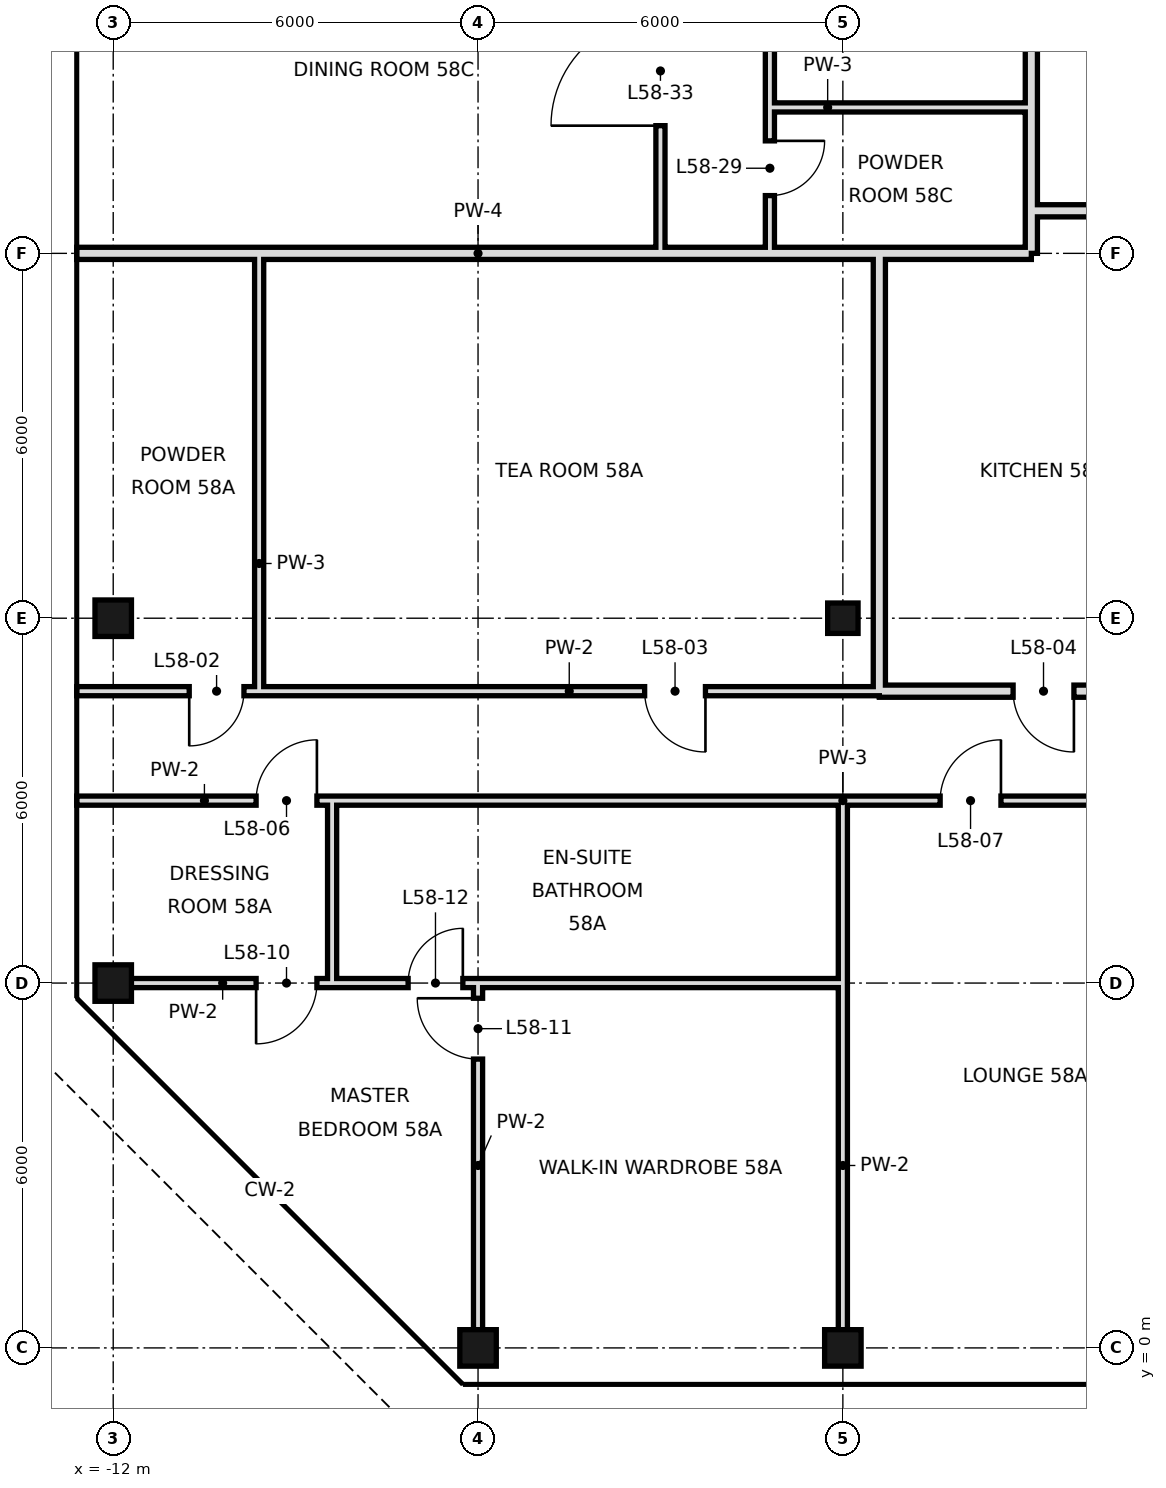
"""IFC4 building model, lengths in metres.
Left out: names, types, materials, properties, quantities, classifications, styles, units other than length and angle.
Written with IfcOpenShell. Run it as: python <this file> out.ifc"""

import sys

from ifc_helpers import new_model, si_unit, direction, frame, frame_2d, origin, origin_2d, place, context, subcontext, project, spatial, rectangle, hollow_rectangle, extrude, element, fill, save


model = new_model("IFC4")
c1 = context("Model", 3, precision=1e-05, world=origin(), true_north=direction((0.0, 1.0)))
c2 = subcontext(c1, "Body", "Model", "MODEL_VIEW")
j1 = project(units=[si_unit("LENGTHUNIT", "METRE"), si_unit("PLANEANGLEUNIT", "RADIAN")], contexts=[c1])
p1 = place(None, origin())
s1 = spatial("IfcSite", under=j1, at=p1, CompositionType="ELEMENT")
p2 = place(p1, origin())
s2 = spatial("IfcBuilding", under=s1, at=p2, CompositionType="ELEMENT")
p3 = place(p2, frame((0.0, 0.0, 246.8)))
s3 = spatial("IfcBuildingStorey", under=s2, at=p3, CompositionType="ELEMENT", Elevation=246.8)
for number, where, z_axis, x_axis in (
    (1, (-12.0, 6.0, 0.0), (0.0, 0.0, 1.0), (1.0, 0.0, 0.0)),
    (2, (-12.0, 12.0, 0.0), (0.0, 0.0, 1.0), (1.0, 0.0, 0.0)),
    (3, (-6.0, 0.0, 0.0), (0.0, 0.0, 1.0), (1.0, 0.0, 0.0)),
    (4, (0.0, 0.0, 0.0), (0.0, 0.0, 1.0), (1.0, 0.0, 0.0)),
):
    element("IfcColumn", number, at=place(p3, frame(where, z_axis=z_axis, x_axis=x_axis)), inside=s3, PredefinedType="COLUMN", context=c2, shape_type="SweptSolid", body=[
        extrude(hollow_rectangle(XDim=0.6, YDim=0.6, WallThickness=0.028, at=origin_2d()), origin(), (0.0, 0.0, 1.0), 3.6),
    ])
p4 = place(p3, frame((0.0, 12.0, 0.0), z_axis=(0.0, 0.0, 1.0), x_axis=(1.0, 0.0, 0.0)))
e5 = element("IfcColumn", 5, at=p4, inside=s3, PredefinedType="COLUMN", context=c2, shape_type="SweptSolid", body=[
    extrude(hollow_rectangle(XDim=0.5, YDim=0.5, WallThickness=0.025, at=origin_2d()), origin(), (0.0, 0.0, 1.0), 3.6),
])
p5 = place(p3, frame((-1.2, 20.4, 0.0), z_axis=(0.0, 0.0, 1.0), x_axis=(0.0, 1.0, 0.0)))
e6 = element("IfcWall", 6, at=p5, inside=s3, PredefinedType="PARTITIONING", context=c2, shape_type="SweptSolid", body=[
    extrude(rectangle(XDim=12.0, YDim=0.15, at=frame_2d((6.0, 0.0))), origin(), (0.0, 0.0, 1.0), 3.42),
])
p6 = place(p5, frame((9.28, 0.0, 0.0)))
e7 = element("IfcOpeningElement", 7, at=p6, cuts=e6, PredefinedType="OPENING", context=c2, shape_type="SweptSolid", body=[
    extrude(rectangle(XDim=1.0, YDim=2.4, at=frame_2d((0.5, 1.2))), frame((0.0, 0.085, 0.0), z_axis=(0.0, -1.0, 0.0), x_axis=(1.0, 0.0, 0.0)), (0.0, 0.0, 1.0), 0.17),
])
p7 = place(p5, frame((5.08, 0.0, 0.0)))
e8 = element("IfcOpeningElement", 8, at=p7, cuts=e6, PredefinedType="OPENING", context=c2, shape_type="SweptSolid", body=[
    extrude(rectangle(XDim=1.0, YDim=2.4, at=frame_2d((0.5, 1.2))), frame((0.0, 0.085, 0.0), z_axis=(0.0, -1.0, 0.0), x_axis=(1.0, 0.0, 0.0)), (0.0, 0.0, 1.0), 0.17),
])
p8 = place(p3, frame((-1.2, 18.0, 0.0), z_axis=(0.0, 0.0, 1.0), x_axis=(0.0, 1.0, 0.0)))
e9 = element("IfcWall", 9, at=p8, inside=s3, PredefinedType="PARTITIONING", context=c2, shape_type="SweptSolid", body=[
    extrude(rectangle(XDim=2.4, YDim=0.15, at=frame_2d((1.2, 0.0))), origin(), (0.0, 0.0, 1.0), 3.42),
])
p9 = place(p8, frame((0.95, 0.0, 0.0)))
e10 = element("IfcOpeningElement", 10, at=p9, cuts=e9, PredefinedType="OPENING", context=c2, shape_type="SweptSolid", body=[
    extrude(rectangle(XDim=0.9, YDim=2.4, at=frame_2d((0.45, 1.2))), frame((0.0, 0.085, 0.0), z_axis=(0.0, -1.0, 0.0), x_axis=(1.0, 0.0, 0.0)), (0.0, 0.0, 1.0), 0.17),
])
p10 = place(p3, frame((-3.0, 18.0, 0.0), z_axis=(0.0, 0.0, 1.0), x_axis=(0.0, 1.0, 0.0)))
e11 = element("IfcWall", 11, at=p10, inside=s3, PredefinedType="PARTITIONING", context=c2, shape_type="SweptSolid", body=[
    extrude(rectangle(XDim=18.0, YDim=0.15, at=frame_2d((9.0, 0.0))), origin(), (0.0, 0.0, 1.0), 3.42),
])
p11 = place(p10, frame((2.1, 0.0, 0.0)))
e12 = element("IfcOpeningElement", 12, at=p11, cuts=e11, PredefinedType="OPENING", context=c2, shape_type="SweptSolid", body=[
    extrude(rectangle(XDim=1.8, YDim=2.4, at=frame_2d((0.9, 1.2))), frame((0.0, 0.085, 0.0), z_axis=(0.0, -1.0, 0.0), x_axis=(1.0, 0.0, 0.0)), (0.0, 0.0, 1.0), 0.17),
])
p12 = place(p10, frame((13.04, 0.0, 0.0)))
e13 = element("IfcOpeningElement", 13, at=p12, cuts=e11, PredefinedType="OPENING", context=c2, shape_type="SweptSolid", body=[
    extrude(rectangle(XDim=1.8, YDim=2.4, at=frame_2d((0.9, 1.2))), frame((0.0, 0.085, 0.0), z_axis=(0.0, -1.0, 0.0), x_axis=(1.0, 0.0, 0.0)), (0.0, 0.0, 1.0), 0.17),
])
p13 = place(p3, frame((-6.0, 0.0, 0.0), z_axis=(0.0, 0.0, 1.0), x_axis=(0.0, 1.0, 0.0)))
e14 = element("IfcWall", 14, at=p13, inside=s3, PredefinedType="PARTITIONING", context=c2, shape_type="SweptSolid", body=[
    extrude(rectangle(XDim=6.0, YDim=0.15, at=frame_2d((3.0, 0.0))), origin(), (0.0, 0.0, 1.0), 3.42),
])
p14 = place(p13, frame((4.75, 0.0, 0.0)))
e15 = element("IfcOpeningElement", 15, at=p14, cuts=e14, PredefinedType="OPENING", context=c2, shape_type="SweptSolid", body=[
    extrude(rectangle(XDim=1.0, YDim=2.4, at=frame_2d((0.5, 1.2))), frame((0.0, 0.085, 0.0), z_axis=(0.0, -1.0, 0.0), x_axis=(1.0, 0.0, 0.0)), (0.0, 0.0, 1.0), 0.17),
])
p15 = place(p3, frame((-8.4, 6.0, 0.0), z_axis=(0.0, 0.0, 1.0), x_axis=(0.0, 1.0, 0.0)))
e16 = element("IfcWall", 16, at=p15, inside=s3, PredefinedType="PARTITIONING", context=c2, shape_type="SweptSolid", body=[
    extrude(rectangle(XDim=3.0, YDim=0.15, at=frame_2d((1.5, 0.0))), origin(), (0.0, 0.0, 1.0), 3.42),
])
p16 = place(p3, frame((-9.6, 10.8, 0.0), z_axis=(0.0, 0.0, 1.0), x_axis=(0.0, 1.0, 0.0)))
e17 = element("IfcWall", 17, at=p16, inside=s3, PredefinedType="PARTITIONING", context=c2, shape_type="SweptSolid", body=[
    extrude(rectangle(XDim=7.2, YDim=0.15, at=frame_2d((3.6, 0.0))), origin(), (0.0, 0.0, 1.0), 3.42),
])
p17 = place(p3, frame((0.0, 0.0, 0.0), z_axis=(0.0, 0.0, 1.0), x_axis=(0.0, 1.0, 0.0)))
e18 = element("IfcWall", 18, at=p17, inside=s3, PredefinedType="PARTITIONING", context=c2, shape_type="SweptSolid", body=[
    extrude(rectangle(XDim=6.0, YDim=0.15, at=frame_2d((3.0, 0.0))), origin(), (0.0, 0.0, 1.0), 2.72),
])
p18 = place(p3, frame((0.0, 6.0, 0.0), z_axis=(0.0, 0.0, 1.0), x_axis=(0.0, 1.0, 0.0)))
e19 = element("IfcWall", 19, at=p18, inside=s3, PredefinedType="PARTITIONING", context=c2, shape_type="SweptSolid", body=[
    extrude(rectangle(XDim=3.0, YDim=0.15, at=frame_2d((1.5, 0.0))), origin(), (0.0, 0.0, 1.0), 2.72),
])
p19 = place(p3, frame((0.6, 10.8, 0.0), z_axis=(0.0, 0.0, 1.0), x_axis=(0.0, 1.0, 0.0)))
e20 = element("IfcWall", 20, at=p19, inside=s3, PredefinedType="SOLIDWALL", context=c2, shape_type="SweptSolid", body=[
    extrude(rectangle(XDim=7.2, YDim=0.2, at=frame_2d((3.6, 0.0))), origin(), (0.0, 0.0, 1.0), 2.72),
])
p20 = place(p3, frame((3.1, 18.7, 0.0), z_axis=(0.0, 0.0, 1.0), x_axis=(0.0, 1.0, 0.0)))
e21 = element("IfcWall", 21, at=p20, inside=s3, PredefinedType="SOLIDWALL", context=c2, shape_type="SweptSolid", body=[
    extrude(rectangle(XDim=13.7, YDim=0.2, at=frame_2d((6.85, 0.0))), origin(), (0.0, 0.0, 1.0), 2.97),
])
p21 = place(p20, frame((11.3, 0.0, 0.0)))
e22 = element("IfcOpeningElement", 22, at=p21, cuts=e21, PredefinedType="OPENING", context=c2, shape_type="SweptSolid", body=[
    extrude(rectangle(XDim=1.2, YDim=2.4, at=frame_2d((0.6, 1.2))), frame((0.0, 0.11, 0.0), z_axis=(0.0, -1.0, 0.0), x_axis=(1.0, 0.0, 0.0)), (0.0, 0.0, 1.0), 0.22),
])
p22 = place(p3, frame((3.1, 18.0, 0.0), z_axis=(0.0, 0.0, 1.0), x_axis=(0.0, 1.0, 0.0)))
e23 = element("IfcWall", 23, at=p22, inside=s3, PredefinedType="SOLIDWALL", context=c2, shape_type="SweptSolid", body=[
    extrude(rectangle(XDim=0.7, YDim=0.2, at=frame_2d((0.35, 0.0))), origin(), (0.0, 0.0, 1.0), 2.97),
])
p23 = place(p3, frame((0.6, 10.8, 0.0), z_axis=(0.0, 0.0, 1.0), x_axis=(1.0, 0.0, 0.0)))
e24 = element("IfcWall", 24, at=p23, inside=s3, PredefinedType="SOLIDWALL", context=c2, shape_type="SweptSolid", body=[
    extrude(rectangle(XDim=5.4, YDim=0.2, at=frame_2d((2.7, 0.0))), origin(), (0.0, 0.0, 1.0), 2.72),
])
p24 = place(p23, frame((2.2, 0.0, 0.0)))
e25 = element("IfcOpeningElement", 25, at=p24, cuts=e24, PredefinedType="OPENING", context=c2, shape_type="SweptSolid", body=[
    extrude(rectangle(XDim=1.0, YDim=2.4, at=frame_2d((0.5, 1.2))), frame((0.0, 0.11, 0.0), z_axis=(0.0, -1.0, 0.0), x_axis=(1.0, 0.0, 0.0)), (0.0, 0.0, 1.0), 0.22),
])
p25 = place(p3, frame((-9.6, 10.8, 0.0), z_axis=(0.0, 0.0, 1.0), x_axis=(1.0, 0.0, 0.0)))
e26 = element("IfcWall", 26, at=p25, inside=s3, PredefinedType="PARTITIONING", context=c2, shape_type="SweptSolid", body=[
    extrude(rectangle(XDim=10.2, YDim=0.15, at=frame_2d((5.1, 0.0))), origin(), (0.0, 0.0, 1.0), 3.42),
])
p26 = place(p25, frame((6.34, 0.0, 0.0)))
e27 = element("IfcOpeningElement", 27, at=p26, cuts=e26, PredefinedType="OPENING", context=c2, shape_type="SweptSolid", body=[
    extrude(rectangle(XDim=1.0, YDim=2.4, at=frame_2d((0.5, 1.2))), frame((0.0, 0.085, 0.0), z_axis=(0.0, -1.0, 0.0), x_axis=(1.0, 0.0, 0.0)), (0.0, 0.0, 1.0), 0.17),
])
p27 = place(p3, frame((-12.6, 10.8, 0.0), z_axis=(0.0, 0.0, 1.0), x_axis=(1.0, 0.0, 0.0)))
e28 = element("IfcWall", 28, at=p27, inside=s3, PredefinedType="PARTITIONING", context=c2, shape_type="SweptSolid", body=[
    extrude(rectangle(XDim=3.0, YDim=0.15, at=frame_2d((1.5, 0.0))), origin(), (0.0, 0.0, 1.0), 3.42),
])
p28 = place(p27, frame((1.85, 0.0, 0.0)))
e29 = element("IfcOpeningElement", 29, at=p28, cuts=e28, PredefinedType="OPENING", context=c2, shape_type="SweptSolid", body=[
    extrude(rectangle(XDim=0.9, YDim=2.4, at=frame_2d((0.45, 1.2))), frame((0.0, 0.085, 0.0), z_axis=(0.0, -1.0, 0.0), x_axis=(1.0, 0.0, 0.0)), (0.0, 0.0, 1.0), 0.17),
])
p29 = place(p3, frame((0.6, 18.0, 0.0), z_axis=(0.0, 0.0, 1.0), x_axis=(1.0, 0.0, 0.0)))
e30 = element("IfcWall", 30, at=p29, inside=s3, PredefinedType="SOLIDWALL", context=c2, shape_type="SweptSolid", body=[
    extrude(rectangle(XDim=2.5, YDim=0.2, at=frame_2d((1.25, 0.0))), origin(), (0.0, 0.0, 1.0), 2.97),
])
p30 = place(p3, frame((-12.6, 18.0, 0.0), z_axis=(0.0, 0.0, 1.0), x_axis=(1.0, 0.0, 0.0)))
e31 = element("IfcWall", 31, at=p30, inside=s3, PredefinedType="SOLIDWALL", context=c2, shape_type="SweptSolid", body=[
    extrude(rectangle(XDim=13.2, YDim=0.2, at=frame_2d((6.6, 0.0))), origin(), (0.0, 0.0, 1.0), 2.72),
])
p31 = place(p3, frame((3.1, 18.7, 0.0), z_axis=(0.0, 0.0, 1.0), x_axis=(1.0, 0.0, 0.0)))
e32 = element("IfcWall", 32, at=p31, inside=s3, PredefinedType="SOLIDWALL", context=c2, shape_type="SweptSolid", body=[
    extrude(rectangle(XDim=2.9, YDim=0.2, at=frame_2d((1.45, 0.0))), origin(), (0.0, 0.0, 1.0), 2.72),
])
p32 = place(p3, frame((-1.2, 20.4, 0.0), z_axis=(0.0, 0.0, 1.0), x_axis=(1.0, 0.0, 0.0)))
e33 = element("IfcWall", 33, at=p32, inside=s3, PredefinedType="PARTITIONING", context=c2, shape_type="SweptSolid", body=[
    extrude(rectangle(XDim=4.3, YDim=0.15, at=frame_2d((2.15, 0.0))), origin(), (0.0, 0.0, 1.0), 3.42),
])
p33 = place(p3, frame((-12.0, 6.0, 0.0), z_axis=(0.0, 0.0, 1.0), x_axis=(1.0, 0.0, 0.0)))
e34 = element("IfcWall", 34, at=p33, inside=s3, PredefinedType="PARTITIONING", context=c2, shape_type="SweptSolid", body=[
    extrude(rectangle(XDim=3.6, YDim=0.15, at=frame_2d((1.8, 0.0))), origin(), (0.0, 0.0, 1.0), 2.72),
])
p34 = place(p33, frame((2.35, 0.0, 0.0)))
e35 = element("IfcOpeningElement", 35, at=p34, cuts=e34, PredefinedType="OPENING", context=c2, shape_type="SweptSolid", body=[
    extrude(rectangle(XDim=1.0, YDim=2.4, at=frame_2d((0.5, 1.2))), frame((0.0, 0.085, 0.0), z_axis=(0.0, -1.0, 0.0), x_axis=(1.0, 0.0, 0.0)), (0.0, 0.0, 1.0), 0.17),
])
p35 = place(p3, frame((-8.4, 6.0, 0.0), z_axis=(0.0, 0.0, 1.0), x_axis=(1.0, 0.0, 0.0)))
e36 = element("IfcWall", 36, at=p35, inside=s3, PredefinedType="PARTITIONING", context=c2, shape_type="SweptSolid", body=[
    extrude(rectangle(XDim=8.4, YDim=0.15, at=frame_2d((4.2, 0.0))), origin(), (0.0, 0.0, 1.0), 2.72),
])
p36 = place(p35, frame((1.25, 0.0, 0.0)))
e37 = element("IfcOpeningElement", 37, at=p36, cuts=e36, PredefinedType="OPENING", context=c2, shape_type="SweptSolid", body=[
    extrude(rectangle(XDim=0.9, YDim=2.4, at=frame_2d((0.45, 1.2))), frame((0.0, 0.085, 0.0), z_axis=(0.0, -1.0, 0.0), x_axis=(1.0, 0.0, 0.0)), (0.0, 0.0, 1.0), 0.17),
])
p37 = place(p3, frame((-12.6, 9.0, 0.0), z_axis=(0.0, 0.0, 1.0), x_axis=(1.0, 0.0, 0.0)))
e38 = element("IfcWall", 38, at=p37, inside=s3, PredefinedType="PARTITIONING", context=c2, shape_type="SweptSolid", body=[
    extrude(rectangle(XDim=4.2, YDim=0.15, at=frame_2d((2.1, 0.0))), origin(), (0.0, 0.0, 1.0), 3.42),
])
p38 = place(p37, frame((2.95, 0.0, 0.0)))
e39 = element("IfcOpeningElement", 39, at=p38, cuts=e38, PredefinedType="OPENING", context=c2, shape_type="SweptSolid", body=[
    extrude(rectangle(XDim=1.0, YDim=2.4, at=frame_2d((0.5, 1.2))), frame((0.0, 0.085, 0.0), z_axis=(0.0, -1.0, 0.0), x_axis=(1.0, 0.0, 0.0)), (0.0, 0.0, 1.0), 0.17),
])
p39 = place(p3, frame((0.0, 9.0, 0.0), z_axis=(0.0, 0.0, 1.0), x_axis=(1.0, 0.0, 0.0)))
e40 = element("IfcWall", 40, at=p39, inside=s3, PredefinedType="PARTITIONING", context=c2, shape_type="SweptSolid", body=[
    extrude(rectangle(XDim=33.0, YDim=0.15, at=frame_2d((16.5, 0.0))), origin(), (0.0, 0.0, 1.0), 3.42),
])
p40 = place(p39, frame((1.6, 0.0, 0.0)))
e41 = element("IfcOpeningElement", 41, at=p40, cuts=e40, PredefinedType="OPENING", context=c2, shape_type="SweptSolid", body=[
    extrude(rectangle(XDim=1.0, YDim=2.4, at=frame_2d((0.5, 1.2))), frame((0.0, 0.085, 0.0), z_axis=(0.0, -1.0, 0.0), x_axis=(1.0, 0.0, 0.0)), (0.0, 0.0, 1.0), 0.17),
])
p41 = place(p39, frame((9.4, 0.0, 0.0)))
e42 = element("IfcOpeningElement", 42, at=p41, cuts=e40, PredefinedType="OPENING", context=c2, shape_type="SweptSolid", body=[
    extrude(rectangle(XDim=1.0, YDim=2.4, at=frame_2d((0.5, 1.2))), frame((0.0, 0.085, 0.0), z_axis=(0.0, -1.0, 0.0), x_axis=(1.0, 0.0, 0.0)), (0.0, 0.0, 1.0), 0.17),
])
p42 = place(p39, frame((15.16, 0.0, 0.0)))
e43 = element("IfcOpeningElement", 43, at=p42, cuts=e40, PredefinedType="OPENING", context=c2, shape_type="SweptSolid", body=[
    extrude(rectangle(XDim=1.8, YDim=2.4, at=frame_2d((0.9, 1.2))), frame((0.0, 0.085, 0.0), z_axis=(0.0, -1.0, 0.0), x_axis=(1.0, 0.0, 0.0)), (0.0, 0.0, 1.0), 0.17),
])
p43 = place(p39, frame((26.1, 0.0, 0.0)))
e44 = element("IfcOpeningElement", 44, at=p43, cuts=e40, PredefinedType="OPENING", context=c2, shape_type="SweptSolid", body=[
    extrude(rectangle(XDim=1.8, YDim=2.4, at=frame_2d((0.9, 1.2))), frame((0.0, 0.085, 0.0), z_axis=(0.0, -1.0, 0.0), x_axis=(1.0, 0.0, 0.0)), (0.0, 0.0, 1.0), 0.17),
])
p44 = place(p39, frame((30.7, 0.0, 0.0)))
e45 = element("IfcOpeningElement", 45, at=p44, cuts=e40, PredefinedType="OPENING", context=c2, shape_type="SweptSolid", body=[
    extrude(rectangle(XDim=1.0, YDim=2.4, at=frame_2d((0.5, 1.2))), frame((0.0, 0.085, 0.0), z_axis=(0.0, -1.0, 0.0), x_axis=(1.0, 0.0, 0.0)), (0.0, 0.0, 1.0), 0.17),
])
p45 = place(p3, frame((-8.4, 9.0, 0.0), z_axis=(0.0, 0.0, 1.0), x_axis=(1.0, 0.0, 0.0)))
e46 = element("IfcWall", 46, at=p45, inside=s3, PredefinedType="PARTITIONING", context=c2, shape_type="SweptSolid", body=[
    extrude(rectangle(XDim=8.4, YDim=0.15, at=frame_2d((4.2, 0.0))), origin(), (0.0, 0.0, 1.0), 3.42),
])
p46 = place(p28, frame((0.9, 0.0, 0.0), z_axis=(0.0, 0.0, 1.0), x_axis=(-1.0, 0.0, 0.0)))
e47 = element("IfcDoor", 47, at=p46, inside=s3, OperationType="SINGLE_SWING_RIGHT", PredefinedType="DOOR", context=c2, shape_type="SweptSolid", body=[
    extrude(rectangle(XDim=0.9, YDim=2.4, at=frame_2d((0.45, 1.2))), frame((0.0, 0.025, 0.0), z_axis=(0.0, -1.0, 0.0), x_axis=(1.0, 0.0, 0.0)), (0.0, 0.0, 1.0), 0.05),
])
fill(e29, e47)
p47 = place(p26, origin())
e48 = element("IfcDoor", 48, at=p47, inside=s3, OperationType="SINGLE_SWING_RIGHT", PredefinedType="DOOR", context=c2, shape_type="SweptSolid", body=[
    extrude(rectangle(XDim=1.0, YDim=2.4, at=frame_2d((0.5, 1.2))), frame((0.0, 0.025, 0.0), z_axis=(0.0, -1.0, 0.0), x_axis=(1.0, 0.0, 0.0)), (0.0, 0.0, 1.0), 0.05),
])
fill(e27, e48)
p48 = place(p24, origin())
e49 = element("IfcDoor", 49, at=p48, inside=s3, OperationType="SINGLE_SWING_RIGHT", PredefinedType="DOOR", context=c2, shape_type="SweptSolid", body=[
    extrude(rectangle(XDim=1.0, YDim=2.4, at=frame_2d((0.5, 1.2))), frame((0.0, 0.025, 0.0), z_axis=(0.0, -1.0, 0.0), x_axis=(1.0, 0.0, 0.0)), (0.0, 0.0, 1.0), 0.05),
])
fill(e25, e49)
p49 = place(p38, frame((1.0, 0.0, 0.0), z_axis=(0.0, 0.0, 1.0), x_axis=(-1.0, 0.0, 0.0)))
e50 = element("IfcDoor", 50, at=p49, inside=s3, OperationType="SINGLE_SWING_LEFT", PredefinedType="DOOR", context=c2, shape_type="SweptSolid", body=[
    extrude(rectangle(XDim=1.0, YDim=2.4, at=frame_2d((0.5, 1.2))), frame((0.0, 0.025, 0.0), z_axis=(0.0, -1.0, 0.0), x_axis=(1.0, 0.0, 0.0)), (0.0, 0.0, 1.0), 0.05),
])
fill(e39, e50)
p50 = place(p40, frame((1.0, 0.0, 0.0), z_axis=(0.0, 0.0, 1.0), x_axis=(-1.0, 0.0, 0.0)))
e51 = element("IfcDoor", 51, at=p50, inside=s3, OperationType="SINGLE_SWING_LEFT", PredefinedType="DOOR", context=c2, shape_type="SweptSolid", body=[
    extrude(rectangle(XDim=1.0, YDim=2.4, at=frame_2d((0.5, 1.2))), frame((0.0, 0.025, 0.0), z_axis=(0.0, -1.0, 0.0), x_axis=(1.0, 0.0, 0.0)), (0.0, 0.0, 1.0), 0.05),
])
fill(e41, e51)
p51 = place(p34, frame((1.0, 0.0, 0.0), z_axis=(0.0, 0.0, 1.0), x_axis=(-1.0, 0.0, 0.0)))
e52 = element("IfcDoor", 52, at=p51, inside=s3, OperationType="SINGLE_SWING_RIGHT", PredefinedType="DOOR", context=c2, shape_type="SweptSolid", body=[
    extrude(rectangle(XDim=1.0, YDim=2.4, at=frame_2d((0.5, 1.2))), frame((0.0, 0.025, 0.0), z_axis=(0.0, -1.0, 0.0), x_axis=(1.0, 0.0, 0.0)), (0.0, 0.0, 1.0), 0.05),
])
fill(e35, e52)
p52 = place(p14, frame((1.0, 0.0, 0.0), z_axis=(0.0, 0.0, 1.0), x_axis=(-1.0, 0.0, 0.0)))
e53 = element("IfcDoor", 53, at=p52, inside=s3, OperationType="SINGLE_SWING_LEFT", PredefinedType="DOOR", context=c2, shape_type="SweptSolid", body=[
    extrude(rectangle(XDim=1.0, YDim=2.4, at=frame_2d((0.5, 1.2))), frame((0.0, 0.025, 0.0), z_axis=(0.0, -1.0, 0.0), x_axis=(1.0, 0.0, 0.0)), (0.0, 0.0, 1.0), 0.05),
])
fill(e15, e53)
p53 = place(p36, frame((0.9, 0.0, 0.0), z_axis=(0.0, 0.0, 1.0), x_axis=(-1.0, 0.0, 0.0)))
e54 = element("IfcDoor", 54, at=p53, inside=s3, OperationType="SINGLE_SWING_LEFT", PredefinedType="DOOR", context=c2, shape_type="SweptSolid", body=[
    extrude(rectangle(XDim=0.9, YDim=2.4, at=frame_2d((0.45, 1.2))), frame((0.0, 0.025, 0.0), z_axis=(0.0, -1.0, 0.0), x_axis=(1.0, 0.0, 0.0)), (0.0, 0.0, 1.0), 0.05),
])
fill(e37, e54)
p54 = place(p9, origin())
e55 = element("IfcDoor", 55, at=p54, inside=s3, OperationType="SINGLE_SWING_RIGHT", PredefinedType="DOOR", context=c2, shape_type="SweptSolid", body=[
    extrude(rectangle(XDim=0.9, YDim=2.4, at=frame_2d((0.45, 1.2))), frame((0.0, 0.025, 0.0), z_axis=(0.0, -1.0, 0.0), x_axis=(1.0, 0.0, 0.0)), (0.0, 0.0, 1.0), 0.05),
])
fill(e10, e55)
p55 = place(p11, origin())
e56 = element("IfcDoor", 56, at=p55, inside=s3, OperationType="SINGLE_SWING_LEFT", PredefinedType="DOOR", context=c2, shape_type="SweptSolid", body=[
    extrude(rectangle(XDim=1.8, YDim=2.4, at=frame_2d((0.9, 1.2))), frame((0.0, 0.025, 0.0), z_axis=(0.0, -1.0, 0.0), x_axis=(1.0, 0.0, 0.0)), (0.0, 0.0, 1.0), 0.05),
])
fill(e12, e56)
save(model, sys.argv[1])
